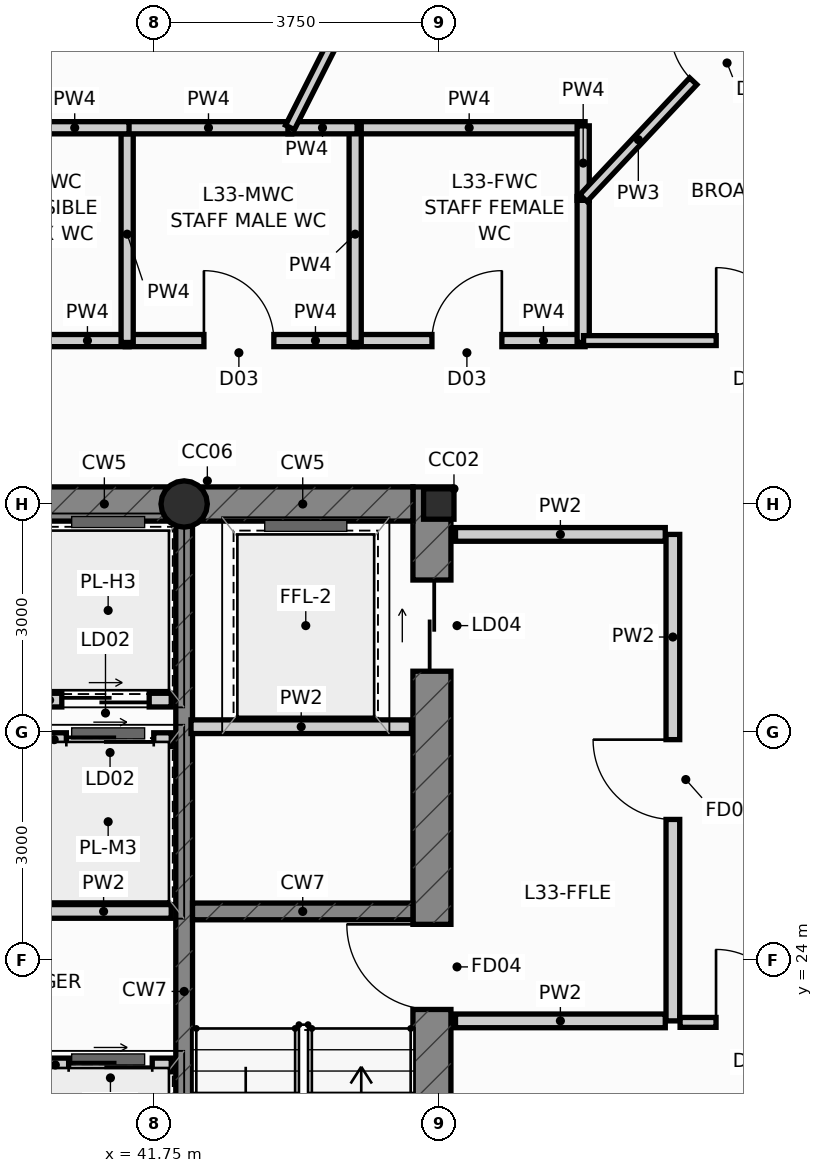
"""IFC4 building model, lengths in metres.
Left out: names, types, materials, properties, quantities, classifications, styles, units other than length and angle.
Written with IfcOpenShell. Run it as: python <this file> out.ifc"""

import sys

from ifc_helpers import new_model, si_unit, direction, frame, frame_2d, origin, origin_2d, place, context, subcontext, project, spatial, rectangle, hollow_circle, i_section, extrude, source, transform, mapped, element, fill, save


model = new_model("IFC4")
c1 = context("Model", 3, precision=1e-05, world=origin(), true_north=direction((0.0, 1.0)))
c2 = subcontext(c1, "Body", "Model", "MODEL_VIEW")
j1 = project(units=[si_unit("LENGTHUNIT", "METRE"), si_unit("PLANEANGLEUNIT", "RADIAN")], contexts=[c1])
p1 = place(None, origin())
s1 = spatial("IfcSite", under=j1, at=p1, CompositionType="ELEMENT")
p2 = place(p1, origin())
s2 = spatial("IfcBuilding", under=s1, at=p2, CompositionType="ELEMENT")
p3 = place(p2, frame((0.0, 0.0, 127.3)))
s3 = spatial("IfcBuildingStorey", under=s2, at=p3, CompositionType="ELEMENT", Elevation=127.3)
m1 = source(origin(), c2, "Body", "SweptSolid", [
    extrude(i_section(OverallWidth=0.4, OverallDepth=0.4, WebThickness=0.02, FlangeThickness=0.032, at=origin_2d()), origin(), (0.0, 0.0, 1.0), 4.5),
])
p4 = place(p3, frame((45.5, 30.0, 0.0), z_axis=(0.0, 0.0, 1.0), x_axis=(1.0, 0.0, 0.0)))
e1 = element("IfcColumn", 1, at=p4, inside=s3, PredefinedType="COLUMN", context=c2, shape_type="MappedRepresentation", body=[
    mapped(m1, transform((0.0, 0.0, 0.0), scale=1.0)),
])
m2 = source(origin(), c2, "Body", "SweptSolid", [
    extrude(hollow_circle(Radius=0.305, WallThickness=0.025, at=origin_2d()), origin(), (0.0, 0.0, 1.0), 4.5),
])
p5 = place(p3, frame((42.15, 30.0, 0.0), z_axis=(0.0, 0.0, 1.0), x_axis=(1.0, 0.0, 0.0)))
e2 = element("IfcColumn", 2, at=p5, inside=s3, PredefinedType="COLUMN", context=c2, shape_type="MappedRepresentation", body=[
    mapped(m2, transform((0.0, 0.0, 0.0), scale=1.0)),
])
p6 = place(p3, frame((45.41, 16.95, 0.0), z_axis=(0.0, 0.0, 1.0), x_axis=(0.0, 1.0, 0.0)))
e3 = element("IfcWall", 3, at=p6, inside=s3, PredefinedType="SHEAR", context=c2, shape_type="SweptSolid", body=[
    extrude(rectangle(XDim=13.275, YDim=0.5, at=frame_2d((6.638, 0.0))), origin(), (0.0, 0.0, 1.0), 4.5),
])
p7 = place(p6, frame((6.4, 0.0, 0.0)))
e4 = element("IfcOpeningElement", 4, at=p7, cuts=e3, PredefinedType="OPENING", context=c2, shape_type="SweptSolid", body=[
    extrude(rectangle(XDim=1.12, YDim=2.15, at=frame_2d((0.56, 1.075))), frame((0.0, 0.262, 0.0), z_axis=(0.0, -1.0, 0.0), x_axis=(1.0, 0.0, 0.0)), (0.0, 0.0, 1.0), 0.524),
])
p8 = place(p6, frame((10.85, 0.0, 0.0)))
e5 = element("IfcOpeningElement", 5, at=p8, cuts=e3, PredefinedType="OPENING", context=c2, shape_type="SweptSolid", body=[
    extrude(rectangle(XDim=1.2, YDim=2.2, at=frame_2d((0.6, 1.1))), frame((0.0, 0.262, 0.0), z_axis=(0.0, -1.0, 0.0), x_axis=(1.0, 0.0, 0.0)), (0.0, 0.0, 1.0), 0.524),
])
p9 = place(p3, frame((40.16, 30.0, 0.0), z_axis=(0.0, 0.0, 1.0), x_axis=(1.0, 0.0, 0.0)))
e6 = element("IfcWall", 6, at=p9, inside=s3, PredefinedType="SHEAR", context=c2, shape_type="SweptSolid", body=[
    extrude(rectangle(XDim=1.88, YDim=0.45, at=frame_2d((0.94, 0.0))), origin(), (0.0, 0.0, 1.0), 4.5),
])
p10 = place(p3, frame((42.26, 30.0, 0.0), z_axis=(0.0, 0.0, 1.0), x_axis=(1.0, 0.0, 0.0)))
e7 = element("IfcWall", 7, at=p10, inside=s3, PredefinedType="SHEAR", context=c2, shape_type="SweptSolid", body=[
    extrude(rectangle(XDim=2.9, YDim=0.45, at=frame_2d((1.45, 0.0))), origin(), (0.0, 0.0, 1.0), 4.5),
])
p11 = place(p3, frame((42.15, 16.95, 0.0), z_axis=(0.0, 0.0, 1.0), x_axis=(0.0, 1.0, 0.0)))
e8 = element("IfcWall", 8, at=p11, inside=s3, PredefinedType="SHEAR", context=c2, shape_type="SweptSolid", body=[
    extrude(rectangle(XDim=13.275, YDim=0.22, at=frame_2d((6.638, 0.0))), origin(), (0.0, 0.0, 1.0), 4.5),
])
p12 = place(p3, frame((42.26, 24.64, 0.0), z_axis=(0.0, 0.0, 1.0), x_axis=(1.0, 0.0, 0.0)))
e9 = element("IfcWall", 9, at=p12, inside=s3, PredefinedType="SHEAR", context=c2, shape_type="SweptSolid", body=[
    extrude(rectangle(XDim=2.9, YDim=0.22, at=frame_2d((1.45, 0.0))), origin(), (0.0, 0.0, 1.0), 4.5),
])
p13 = place(p3, frame((40.28, 22.62, 0.0), z_axis=(0.0, 0.0, 1.0), x_axis=(1.0, 0.0, 0.0)))
e10 = element("IfcWall", 10, at=p13, inside=s3, PredefinedType="PARTITIONING", context=c2, shape_type="SweptSolid", body=[
    extrude(rectangle(XDim=1.7, YDim=0.18, at=frame_2d((0.85, 0.0))), origin(), (0.0, 0.0, 1.0), 4.25),
])
p14 = place(p13, frame((0.35, 0.0, 0.0)))
e11 = element("IfcOpeningElement", 11, at=p14, cuts=e10, PredefinedType="OPENING", context=c2, shape_type="SweptSolid", body=[
    extrude(rectangle(XDim=1.1, YDim=2.2, at=frame_2d((0.55, 1.1))), frame((0.0, 0.102, 0.0), z_axis=(0.0, -1.0, 0.0), x_axis=(1.0, 0.0, 0.0)), (0.0, 0.0, 1.0), 0.204),
])
p15 = place(p3, frame((40.28, 26.9, 0.0), z_axis=(0.0, 0.0, 1.0), x_axis=(1.0, 0.0, 0.0)))
e12 = element("IfcWall", 12, at=p15, inside=s3, PredefinedType="PARTITIONING", context=c2, shape_type="SweptSolid", body=[
    extrude(rectangle(XDim=1.7, YDim=0.18, at=frame_2d((0.85, 0.0))), origin(), (0.0, 0.0, 1.0), 4.25),
])
p16 = place(p15, frame((0.32, 0.0, 0.0)))
e13 = element("IfcOpeningElement", 13, at=p16, cuts=e12, PredefinedType="OPENING", context=c2, shape_type="SweptSolid", body=[
    extrude(rectangle(XDim=1.15, YDim=2.2, at=frame_2d((0.575, 1.1))), frame((0.0, 0.102, 0.0), z_axis=(0.0, -1.0, 0.0), x_axis=(1.0, 0.0, 0.0)), (0.0, 0.0, 1.0), 0.204),
])
p17 = place(p3, frame((40.2, 24.64, 0.0), z_axis=(0.0, 0.0, 1.0), x_axis=(1.0, 0.0, 0.0)))
e14 = element("IfcWall", 14, at=p17, inside=s3, PredefinedType="PARTITIONING", context=c2, shape_type="SweptSolid", body=[
    extrude(rectangle(XDim=1.78, YDim=0.18, at=frame_2d((0.89, 0.0))), origin(), (0.0, 0.0, 1.0), 4.25),
])
p18 = place(p3, frame((40.22, 27.42, 0.0), z_axis=(0.0, 0.0, 1.0), x_axis=(1.0, 0.0, 0.0)))
e15 = element("IfcWall", 15, at=p18, inside=s3, PredefinedType="PARTITIONING", context=c2, shape_type="SweptSolid", body=[
    extrude(rectangle(XDim=1.76, YDim=0.18, at=frame_2d((0.88, 0.0))), origin(), (0.0, 0.0, 1.0), 4.25),
])
p19 = place(p18, frame((0.32, 0.0, 0.0)))
e16 = element("IfcOpeningElement", 16, at=p19, cuts=e15, PredefinedType="OPENING", context=c2, shape_type="SweptSolid", body=[
    extrude(rectangle(XDim=1.15, YDim=2.2, at=frame_2d((0.575, 1.1))), frame((0.0, 0.102, 0.0), z_axis=(0.0, -1.0, 0.0), x_axis=(1.0, 0.0, 0.0)), (0.0, 0.0, 1.0), 0.204),
])
p20 = place(p3, frame((48.58, 23.2, 0.0), z_axis=(0.0, 0.0, 1.0), x_axis=(0.0, 1.0, 0.0)))
e17 = element("IfcWall", 17, at=p20, inside=s3, PredefinedType="PARTITIONING", context=c2, shape_type="SweptSolid", body=[
    extrude(rectangle(XDim=6.4, YDim=0.18, at=frame_2d((3.2, 0.0))), origin(), (0.0, 0.0, 1.0), 3.928),
])
p21 = place(p20, frame((2.65, 0.0, 0.0)))
e18 = element("IfcOpeningElement", 18, at=p21, cuts=e17, PredefinedType="OPENING", context=c2, shape_type="SweptSolid", body=[
    extrude(rectangle(XDim=1.05, YDim=2.15, at=frame_2d((0.525, 1.075))), frame((0.0, 0.102, 0.0), z_axis=(0.0, -1.0, 0.0), x_axis=(1.0, 0.0, 0.0)), (0.0, 0.0, 1.0), 0.204),
])
p22 = place(p3, frame((45.72, 23.2, 0.0), z_axis=(0.0, 0.0, 1.0), x_axis=(1.0, 0.0, 0.0)))
e19 = element("IfcWall", 19, at=p22, inside=s3, PredefinedType="PARTITIONING", context=c2, shape_type="SweptSolid", body=[
    extrude(rectangle(XDim=2.76, YDim=0.18, at=frame_2d((1.38, 0.0))), origin(), (0.0, 0.0, 1.0), 4.25),
])
p23 = place(p3, frame((45.72, 29.6, 0.0), z_axis=(0.0, 0.0, 1.0), x_axis=(1.0, 0.0, 0.0)))
e20 = element("IfcWall", 20, at=p23, inside=s3, PredefinedType="PARTITIONING", context=c2, shape_type="SweptSolid", body=[
    extrude(rectangle(XDim=2.76, YDim=0.18, at=frame_2d((1.38, 0.0))), origin(), (0.0, 0.0, 1.0), 3.775),
])
p24 = place(p3, frame((42.24, 27.07, 0.0), z_axis=(0.0, 0.0, 1.0), x_axis=(1.0, 0.0, 0.0)))
e21 = element("IfcWall", 21, at=p24, inside=s3, PredefinedType="PARTITIONING", context=c2, shape_type="SweptSolid", body=[
    extrude(rectangle(XDim=2.9, YDim=0.18, at=frame_2d((1.45, 0.0))), origin(), (0.0, 0.0, 1.0), 4.25),
])
p25 = place(p3, frame((38.375, 32.15, 0.0), z_axis=(0.0, 0.0, 1.0), x_axis=(1.0, 0.0, 0.0)))
e22 = element("IfcWall", 22, at=p25, inside=s3, PredefinedType="PLUMBINGWALL", context=c2, shape_type="SweptSolid", body=[
    extrude(rectangle(XDim=3.05, YDim=0.16, at=frame_2d((1.525, 0.0))), origin(), (0.0, 0.0, 1.0), 3.928),
])
p26 = place(p25, frame((1.035, 0.0, 0.0)))
e23 = element("IfcOpeningElement", 23, at=p26, cuts=e22, PredefinedType="OPENING", context=c2, shape_type="SweptSolid", body=[
    extrude(rectangle(XDim=0.92, YDim=2.1, at=frame_2d((0.46, 1.05))), frame((0.0, 0.092, 0.0), z_axis=(0.0, -1.0, 0.0), x_axis=(1.0, 0.0, 0.0)), (0.0, 0.0, 1.0), 0.184),
])
p27 = place(p3, frame((41.375, 32.15, 0.0), z_axis=(0.0, 0.0, 1.0), x_axis=(1.0, 0.0, 0.0)))
e24 = element("IfcWall", 24, at=p27, inside=s3, PredefinedType="PLUMBINGWALL", context=c2, shape_type="SweptSolid", body=[
    extrude(rectangle(XDim=3.05, YDim=0.16, at=frame_2d((1.525, 0.0))), origin(), (0.0, 0.0, 1.0), 3.928),
])
p28 = place(p27, frame((1.035, 0.0, 0.0)))
e25 = element("IfcOpeningElement", 25, at=p28, cuts=e24, PredefinedType="OPENING", context=c2, shape_type="SweptSolid", body=[
    extrude(rectangle(XDim=0.92, YDim=2.1, at=frame_2d((0.46, 1.05))), frame((0.0, 0.092, 0.0), z_axis=(0.0, -1.0, 0.0), x_axis=(1.0, 0.0, 0.0)), (0.0, 0.0, 1.0), 0.184),
])
p29 = place(p3, frame((44.375, 32.15, 0.0), z_axis=(0.0, 0.0, 1.0), x_axis=(1.0, 0.0, 0.0)))
e26 = element("IfcWall", 26, at=p29, inside=s3, PredefinedType="PLUMBINGWALL", context=c2, shape_type="SweptSolid", body=[
    extrude(rectangle(XDim=3.05, YDim=0.16, at=frame_2d((1.525, 0.0))), origin(), (0.0, 0.0, 1.0), 3.928),
])
p30 = place(p29, frame((1.035, 0.0, 0.0)))
e27 = element("IfcOpeningElement", 27, at=p30, cuts=e26, PredefinedType="OPENING", context=c2, shape_type="SweptSolid", body=[
    extrude(rectangle(XDim=0.92, YDim=2.1, at=frame_2d((0.46, 1.05))), frame((0.0, 0.092, 0.0), z_axis=(0.0, -1.0, 0.0), x_axis=(1.0, 0.0, 0.0)), (0.0, 0.0, 1.0), 0.184),
])
p31 = place(p3, frame((47.425, 34.95, 0.0), z_axis=(0.0, 0.0, 1.0), x_axis=(-1.0, 0.0, 0.0)))
e28 = element("IfcWall", 28, at=p31, inside=s3, PredefinedType="PLUMBINGWALL", context=c2, shape_type="SweptSolid", body=[
    extrude(rectangle(XDim=3.05, YDim=0.16, at=frame_2d((1.525, 0.0))), origin(), (0.0, 0.0, 1.0), 3.928),
])
for number, where, z_axis, x_axis in (
    (29, (41.4, 32.125, 0.0), (0.0, 0.0, 1.0), (0.0, 1.0, 0.0)),
    (30, (44.4, 32.125, 0.0), (0.0, 0.0, 1.0), (0.0, 1.0, 0.0)),
):
    element("IfcWall", number, at=place(p3, frame(where, z_axis=z_axis, x_axis=x_axis)), inside=s3, PredefinedType="PLUMBINGWALL", context=c2, shape_type="SweptSolid", body=[
        extrude(rectangle(XDim=2.85, YDim=0.16, at=frame_2d((1.425, 0.0))), origin(), (0.0, 0.0, 1.0), 4.25),
    ])
p32 = place(p3, frame((41.375, 34.95, 0.0), z_axis=(0.0, 0.0, 1.0), x_axis=(1.0, 0.0, 0.0)))
e31 = element("IfcWall", 31, at=p32, inside=s3, PredefinedType="PLUMBINGWALL", context=c2, shape_type="SweptSolid", body=[
    extrude(rectangle(XDim=2.19, YDim=0.16, at=frame_2d((1.095, 0.0))), origin(), (0.0, 0.0, 1.0), 3.928),
])
p33 = place(p3, frame((47.4, 32.125, 0.0), z_axis=(0.0, 0.0, 1.0), x_axis=(0.0, 1.0, 0.0)))
e32 = element("IfcWall", 32, at=p33, inside=s3, PredefinedType="PLUMBINGWALL", context=c2, shape_type="SweptSolid", body=[
    extrude(rectangle(XDim=1.92, YDim=0.16, at=frame_2d((0.96, 0.0))), origin(), (0.0, 0.0, 1.0), 4.25),
])
p34 = place(p3, frame((39.995, 34.95, 0.0), z_axis=(0.0, 0.0, 1.0), x_axis=(1.0, 0.0, 0.0)))
e33 = element("IfcWall", 33, at=p34, inside=s3, PredefinedType="PLUMBINGWALL", context=c2, shape_type="SweptSolid", body=[
    extrude(rectangle(XDim=1.43, YDim=0.16, at=frame_2d((0.715, 0.0))), origin(), (0.0, 0.0, 1.0), 3.928),
])
p35 = place(p3, frame((47.4, 33.995, 0.0), z_axis=(0.0, 0.0, 1.0), x_axis=(0.0, 1.0, 0.0)))
e34 = element("IfcWall", 34, at=p35, inside=s3, PredefinedType="PLUMBINGWALL", context=c2, shape_type="SweptSolid", body=[
    extrude(rectangle(XDim=0.98, YDim=0.16, at=frame_2d((0.49, 0.0))), origin(), (0.0, 0.0, 1.0), 4.25),
])
p36 = place(p3, frame((43.515, 34.95, 0.0), z_axis=(0.0, 0.0, 1.0), x_axis=(1.0, 0.0, 0.0)))
e35 = element("IfcWall", 35, at=p36, inside=s3, PredefinedType="PLUMBINGWALL", context=c2, shape_type="SweptSolid", body=[
    extrude(rectangle(XDim=0.91, YDim=0.16, at=frame_2d((0.455, 0.0))), origin(), (0.0, 0.0, 1.0), 3.928),
])
p37 = place(p3, frame((40.021, 34.955, 0.0), z_axis=(0.0, 0.0, 1.0), x_axis=(0.181390390279, 0.983411168492, 0.0)))
e36 = element("IfcWall", 36, at=p37, inside=s3, PredefinedType="PARTITIONING", context=c2, shape_type="SweptSolid", body=[
    extrude(rectangle(XDim=16.764, YDim=0.13, at=frame_2d((8.382, 0.0))), origin(), (0.0, 0.0, 1.0), 4.25),
])
p38 = place(p3, frame((43.542, 34.954, 0.0), z_axis=(0.0, 0.0, 1.0), x_axis=(0.451040991856, 0.89250323454, 0.0)))
e37 = element("IfcWall", 37, at=p38, inside=s3, PredefinedType="PARTITIONING", context=c2, shape_type="SweptSolid", body=[
    extrude(rectangle(XDim=9.303, YDim=0.13, at=frame_2d((4.651, 0.0))), origin(), (0.0, 0.0, 1.0), 4.25),
])
p39 = place(p38, frame((4.229, 0.0, 0.0)))
e38 = element("IfcOpeningElement", 38, at=p39, cuts=e37, PredefinedType="OPENING", context=c2, shape_type="SweptSolid", body=[
    extrude(rectangle(XDim=0.96, YDim=2.15, at=frame_2d((0.48, 1.075))), frame((0.0, 0.077, 0.0), z_axis=(0.0, -1.0, 0.0), x_axis=(1.0, 0.0, 0.0)), (0.0, 0.0, 1.0), 0.154),
])
p40 = place(p3, frame((47.403, 34.024, 0.0), z_axis=(0.0, 0.0, 1.0), x_axis=(0.684663849491, 0.728858980325, 0.0)))
e39 = element("IfcWall", 39, at=p40, inside=s3, PredefinedType="PARTITIONING", context=c2, shape_type="SweptSolid", body=[
    extrude(rectangle(XDim=5.077, YDim=0.13, at=frame_2d((2.538, 0.0))), origin(), (0.0, 0.0, 1.0), 3.775),
])
p41 = place(p40, frame((2.11, 0.0, 0.0)))
e40 = element("IfcOpeningElement", 40, at=p41, cuts=e39, PredefinedType="OPENING", context=c2, shape_type="SweptSolid", body=[
    extrude(rectangle(XDim=0.96, YDim=2.15, at=frame_2d((0.48, 1.075))), frame((0.0, 0.077, 0.0), z_axis=(0.0, -1.0, 0.0), x_axis=(1.0, 0.0, 0.0)), (0.0, 0.0, 1.0), 0.154),
])
p42 = place(p3, frame((47.405, 32.15, 0.0), z_axis=(0.0, 0.0, 1.0), x_axis=(1.0, 0.0, 0.0)))
e41 = element("IfcWall", 41, at=p42, inside=s3, PredefinedType="PARTITIONING", context=c2, shape_type="SweptSolid", body=[
    extrude(rectangle(XDim=4.45, YDim=0.13, at=frame_2d((2.225, 0.0))), origin(), (0.0, 0.0, 1.0), 4.25),
])
p43 = place(p42, frame((1.745, 0.0, 0.0)))
e42 = element("IfcOpeningElement", 42, at=p43, cuts=e41, PredefinedType="OPENING", context=c2, shape_type="SweptSolid", body=[
    extrude(rectangle(XDim=0.96, YDim=2.15, at=frame_2d((0.48, 1.075))), frame((0.0, 0.077, 0.0), z_axis=(0.0, -1.0, 0.0), x_axis=(1.0, 0.0, 0.0)), (0.0, 0.0, 1.0), 0.154),
])
p44 = place(p3, frame((48.675, 23.18, 0.0), z_axis=(0.0, 0.0, 1.0), x_axis=(1.0, 0.0, 0.0)))
e43 = element("IfcWall", 43, at=p44, inside=s3, PredefinedType="PARTITIONING", context=c2, shape_type="SweptSolid", body=[
    extrude(rectangle(XDim=1.905, YDim=0.13, at=frame_2d((0.953, 0.0))), origin(), (0.0, 0.0, 1.0), 4.25),
])
p45 = place(p44, frame((0.473, 0.0, 0.0)))
e44 = element("IfcOpeningElement", 44, at=p45, cuts=e43, PredefinedType="OPENING", context=c2, shape_type="SweptSolid", body=[
    extrude(rectangle(XDim=0.96, YDim=2.15, at=frame_2d((0.48, 1.075))), frame((0.0, 0.077, 0.0), z_axis=(0.0, -1.0, 0.0), x_axis=(1.0, 0.0, 0.0)), (0.0, 0.0, 1.0), 0.154),
])
p46 = place(p7, origin())
e45 = element("IfcDoor", 45, at=p46, inside=s3, OperationType="SINGLE_SWING_RIGHT", PredefinedType="DOOR", context=c2, shape_type="SweptSolid", body=[
    extrude(rectangle(XDim=1.12, YDim=2.15, at=frame_2d((0.56, 1.075))), frame((0.0, 0.025, 0.0), z_axis=(0.0, -1.0, 0.0), x_axis=(1.0, 0.0, 0.0)), (0.0, 0.0, 1.0), 0.05),
])
fill(e4, e45)
p47 = place(p8, origin())
e46 = element("IfcDoor", 46, at=p47, inside=s3, OperationType="SLIDING_TO_RIGHT", PredefinedType="DOOR", context=c2, shape_type="SweptSolid", body=[
    extrude(rectangle(XDim=1.2, YDim=2.2, at=frame_2d((0.6, 1.1))), frame((0.0, 0.025, 0.0), z_axis=(0.0, -1.0, 0.0), x_axis=(1.0, 0.0, 0.0)), (0.0, 0.0, 1.0), 0.05),
])
fill(e5, e46)
p48 = place(p14, origin())
e47 = element("IfcDoor", 47, at=p48, inside=s3, OperationType="SLIDING_TO_LEFT", PredefinedType="DOOR", context=c2, shape_type="SweptSolid", body=[
    extrude(rectangle(XDim=1.1, YDim=2.2, at=frame_2d((0.55, 1.1))), frame((0.0, 0.025, 0.0), z_axis=(0.0, -1.0, 0.0), x_axis=(1.0, 0.0, 0.0)), (0.0, 0.0, 1.0), 0.05),
])
fill(e11, e47)
p49 = place(p16, origin())
e48 = element("IfcDoor", 48, at=p49, inside=s3, OperationType="SLIDING_TO_LEFT", PredefinedType="DOOR", context=c2, shape_type="SweptSolid", body=[
    extrude(rectangle(XDim=1.15, YDim=2.2, at=frame_2d((0.575, 1.1))), frame((0.0, 0.025, 0.0), z_axis=(0.0, -1.0, 0.0), x_axis=(1.0, 0.0, 0.0)), (0.0, 0.0, 1.0), 0.05),
])
fill(e13, e48)
p50 = place(p19, origin())
e49 = element("IfcDoor", 49, at=p50, inside=s3, OperationType="SLIDING_TO_RIGHT", PredefinedType="DOOR", context=c2, shape_type="SweptSolid", body=[
    extrude(rectangle(XDim=1.15, YDim=2.2, at=frame_2d((0.575, 1.1))), frame((0.0, 0.025, 0.0), z_axis=(0.0, -1.0, 0.0), x_axis=(1.0, 0.0, 0.0)), (0.0, 0.0, 1.0), 0.05),
])
fill(e16, e49)
p51 = place(p21, origin())
e50 = element("IfcDoor", 50, at=p51, inside=s3, OperationType="SINGLE_SWING_RIGHT", PredefinedType="DOOR", context=c2, shape_type="SweptSolid", body=[
    extrude(rectangle(XDim=1.05, YDim=2.15, at=frame_2d((0.525, 1.075))), frame((0.0, 0.025, 0.0), z_axis=(0.0, -1.0, 0.0), x_axis=(1.0, 0.0, 0.0)), (0.0, 0.0, 1.0), 0.05),
])
fill(e18, e50)
p52 = place(p28, origin())
e51 = element("IfcDoor", 51, at=p52, inside=s3, OperationType="SINGLE_SWING_LEFT", PredefinedType="DOOR", context=c2, shape_type="SweptSolid", body=[
    extrude(rectangle(XDim=0.92, YDim=2.1, at=frame_2d((0.46, 1.05))), frame((0.0, 0.025, 0.0), z_axis=(0.0, -1.0, 0.0), x_axis=(1.0, 0.0, 0.0)), (0.0, 0.0, 1.0), 0.05),
])
fill(e25, e51)
p53 = place(p30, origin())
e52 = element("IfcDoor", 52, at=p53, inside=s3, OperationType="SINGLE_SWING_RIGHT", PredefinedType="DOOR", context=c2, shape_type="SweptSolid", body=[
    extrude(rectangle(XDim=0.92, YDim=2.1, at=frame_2d((0.46, 1.05))), frame((0.0, 0.025, 0.0), z_axis=(0.0, -1.0, 0.0), x_axis=(1.0, 0.0, 0.0)), (0.0, 0.0, 1.0), 0.05),
])
fill(e27, e52)
p54 = place(p41, origin())
e53 = element("IfcDoor", 53, at=p54, inside=s3, OperationType="SINGLE_SWING_RIGHT", PredefinedType="DOOR", context=c2, shape_type="SweptSolid", body=[
    extrude(rectangle(XDim=0.96, YDim=2.15, at=frame_2d((0.48, 1.075))), frame((0.0, 0.025, 0.0), z_axis=(0.0, -1.0, 0.0), x_axis=(1.0, 0.0, 0.0)), (0.0, 0.0, 1.0), 0.05),
])
fill(e40, e53)
p55 = place(p43, origin())
e54 = element("IfcDoor", 54, at=p55, inside=s3, OperationType="SINGLE_SWING_LEFT", PredefinedType="DOOR", context=c2, shape_type="SweptSolid", body=[
    extrude(rectangle(XDim=0.96, YDim=2.15, at=frame_2d((0.48, 1.075))), frame((0.0, 0.025, 0.0), z_axis=(0.0, -1.0, 0.0), x_axis=(1.0, 0.0, 0.0)), (0.0, 0.0, 1.0), 0.05),
])
fill(e42, e54)
p56 = place(p45, origin())
e55 = element("IfcDoor", 55, at=p56, inside=s3, OperationType="SINGLE_SWING_LEFT", PredefinedType="DOOR", context=c2, shape_type="SweptSolid", body=[
    extrude(rectangle(XDim=0.96, YDim=2.15, at=frame_2d((0.48, 1.075))), frame((0.0, 0.025, 0.0), z_axis=(0.0, -1.0, 0.0), x_axis=(1.0, 0.0, 0.0)), (0.0, 0.0, 1.0), 0.05),
])
fill(e44, e55)
save(model, sys.argv[1])
